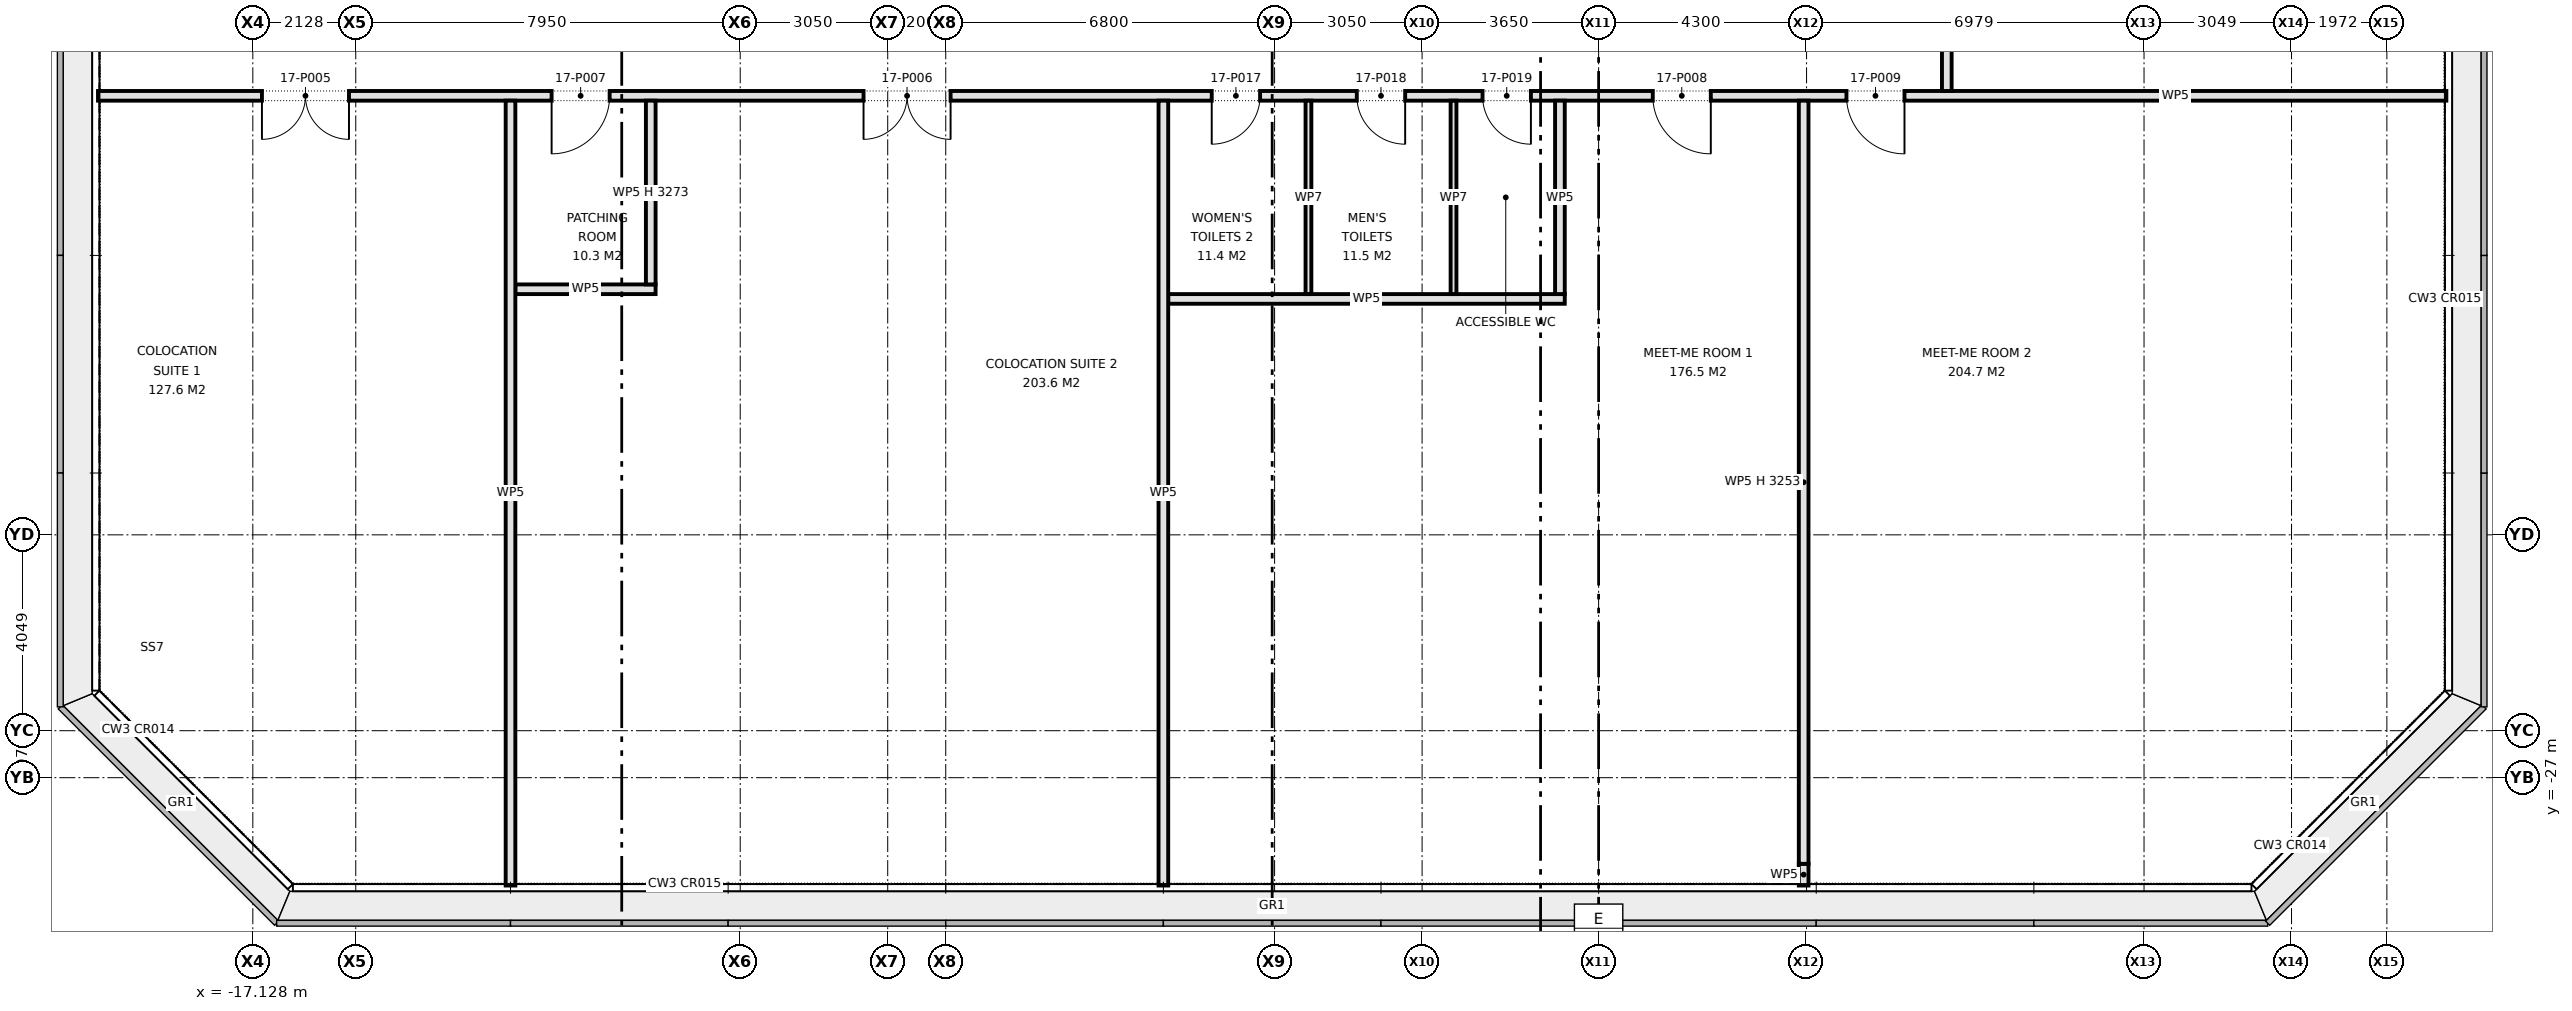
"""IFC4 building model, lengths in metres.
Left out: names, types, materials, properties, quantities, classifications, styles, units other than length and angle.
Written with IfcOpenShell. Run it as: python <this file> out.ifc"""

import sys

from ifc_helpers import new_model, si_unit, direction, frame, frame_2d, origin, place, context, subcontext, project, spatial, rectangle, extrude, element, fill, save


model = new_model("IFC4")
c1 = context("Model", 3, precision=1e-05, world=origin(), true_north=direction((0.0, 1.0)))
c2 = subcontext(c1, "Body", "Model", "MODEL_VIEW")
j1 = project(units=[si_unit("LENGTHUNIT", "METRE"), si_unit("PLANEANGLEUNIT", "RADIAN")], contexts=[c1])
p1 = place(None, origin())
s1 = spatial("IfcSite", under=j1, at=p1, CompositionType="ELEMENT")
p2 = place(p1, origin())
s2 = spatial("IfcBuilding", under=s1, at=p2, CompositionType="ELEMENT")
p3 = place(p2, frame((0.0, 0.0, 77.6)))
s3 = spatial("IfcBuildingStorey", under=s2, at=p3, CompositionType="ELEMENT", Elevation=77.6)
p4 = place(p3, frame((1.8, -17.1, 0.0), z_axis=(0.0, 0.0, 1.0), x_axis=(1.0, 0.0, 0.0)))
e1 = element("IfcWall", 1, at=p4, inside=s3, PredefinedType="PARTITIONING", context=c2, shape_type="SweptSolid", body=[
    extrude(rectangle(XDim=8.2, YDim=0.2, at=frame_2d((4.1, 0.0))), origin(), (0.0, 0.0, 1.0), 4.2),
])
p5 = place(p3, frame((-11.7, -16.9, 0.0), z_axis=(0.0, 0.0, 1.0), x_axis=(1.0, 0.0, 0.0)))
e2 = element("IfcWall", 2, at=p5, inside=s3, PredefinedType="PARTITIONING", context=c2, shape_type="SweptSolid", body=[
    extrude(rectangle(XDim=2.9, YDim=0.2, at=frame_2d((1.45, 0.0))), origin(), (0.0, 0.0, 1.0), 4.2),
])
p6 = place(p3, frame((-20.33, -12.9, 0.0), z_axis=(0.0, 0.0, 1.0), x_axis=(1.0, 0.0, 0.0)))
e3 = element("IfcWall", 3, at=p6, inside=s3, PredefinedType="PARTITIONING", context=c2, shape_type="SweptSolid", body=[
    extrude(rectangle(XDim=48.56, YDim=0.2, at=frame_2d((24.28, 0.0))), origin(), (0.0, 0.0, 1.0), 4.2),
])
p7 = place(p6, frame((3.39, 0.0, 0.0)))
e4 = element("IfcOpeningElement", 4, at=p7, cuts=e3, PredefinedType="OPENING", context=c2, shape_type="SweptSolid", body=[
    extrude(rectangle(XDim=1.8, YDim=2.1, at=frame_2d((0.9, 1.05))), frame((0.0, 0.11, 0.0), z_axis=(0.0, -1.0, 0.0), x_axis=(1.0, 0.0, 0.0)), (0.0, 0.0, 1.0), 0.22),
])
p8 = place(p6, frame((15.83, 0.0, 0.0)))
e5 = element("IfcOpeningElement", 5, at=p8, cuts=e3, PredefinedType="OPENING", context=c2, shape_type="SweptSolid", body=[
    extrude(rectangle(XDim=1.8, YDim=2.1, at=frame_2d((0.9, 1.05))), frame((0.0, 0.11, 0.0), z_axis=(0.0, -1.0, 0.0), x_axis=(1.0, 0.0, 0.0)), (0.0, 0.0, 1.0), 0.22),
])
p9 = place(p6, frame((9.38, 0.0, 0.0)))
e6 = element("IfcOpeningElement", 6, at=p9, cuts=e3, PredefinedType="OPENING", context=c2, shape_type="SweptSolid", body=[
    extrude(rectangle(XDim=1.2, YDim=2.1, at=frame_2d((0.6, 1.05))), frame((0.0, 0.11, 0.0), z_axis=(0.0, -1.0, 0.0), x_axis=(1.0, 0.0, 0.0)), (0.0, 0.0, 1.0), 0.22),
])
p10 = place(p6, frame((32.15, 0.0, 0.0)))
e7 = element("IfcOpeningElement", 7, at=p10, cuts=e3, PredefinedType="OPENING", context=c2, shape_type="SweptSolid", body=[
    extrude(rectangle(XDim=1.2, YDim=2.1, at=frame_2d((0.6, 1.05))), frame((0.0, 0.11, 0.0), z_axis=(0.0, -1.0, 0.0), x_axis=(1.0, 0.0, 0.0)), (0.0, 0.0, 1.0), 0.22),
])
p11 = place(p6, frame((36.155, 0.0, 0.0)))
e8 = element("IfcOpeningElement", 8, at=p11, cuts=e3, PredefinedType="OPENING", context=c2, shape_type="SweptSolid", body=[
    extrude(rectangle(XDim=1.2, YDim=2.1, at=frame_2d((0.6, 1.05))), frame((0.0, 0.11, 0.0), z_axis=(0.0, -1.0, 0.0), x_axis=(1.0, 0.0, 0.0)), (0.0, 0.0, 1.0), 0.22),
])
p12 = place(p6, frame((23.03, 0.0, 0.0)))
e9 = element("IfcOpeningElement", 9, at=p12, cuts=e3, PredefinedType="OPENING", context=c2, shape_type="SweptSolid", body=[
    extrude(rectangle(XDim=1.0, YDim=2.1, at=frame_2d((0.5, 1.05))), frame((0.0, 0.11, 0.0), z_axis=(0.0, -1.0, 0.0), x_axis=(1.0, 0.0, 0.0)), (0.0, 0.0, 1.0), 0.22),
])
p13 = place(p6, frame((26.03, 0.0, 0.0)))
e10 = element("IfcOpeningElement", 10, at=p13, cuts=e3, PredefinedType="OPENING", context=c2, shape_type="SweptSolid", body=[
    extrude(rectangle(XDim=1.0, YDim=2.1, at=frame_2d((0.5, 1.05))), frame((0.0, 0.11, 0.0), z_axis=(0.0, -1.0, 0.0), x_axis=(1.0, 0.0, 0.0)), (0.0, 0.0, 1.0), 0.22),
])
p14 = place(p6, frame((28.63, 0.0, 0.0)))
e11 = element("IfcOpeningElement", 11, at=p14, cuts=e3, PredefinedType="OPENING", context=c2, shape_type="SweptSolid", body=[
    extrude(rectangle(XDim=1.0, YDim=2.1, at=frame_2d((0.5, 1.05))), frame((0.0, 0.11, 0.0), z_axis=(0.0, -1.0, 0.0), x_axis=(1.0, 0.0, 0.0)), (0.0, 0.0, 1.0), 0.22),
])
p15 = place(p3, frame((17.9, -12.8, 0.0), z_axis=(0.0, 0.0, 1.0), x_axis=(0.0, 1.0, 0.0)))
e12 = element("IfcWall", 12, at=p15, inside=s3, PredefinedType="PARTITIONING", context=c2, shape_type="SweptSolid", body=[
    extrude(rectangle(XDim=25.6, YDim=0.2, at=frame_2d((12.8, 0.0))), origin(), (0.0, 0.0, 1.0), 4.2),
])
p16 = place(p15, frame((4.4, 0.0, 0.0)))
e13 = element("IfcOpeningElement", 13, at=p16, cuts=e12, PredefinedType="OPENING", context=c2, shape_type="SweptSolid", body=[
    extrude(rectangle(XDim=1.2, YDim=2.1, at=frame_2d((0.6, 1.05))), frame((0.0, 0.11, 0.0), z_axis=(0.0, -1.0, 0.0), x_axis=(1.0, 0.0, 0.0)), (0.0, 0.0, 1.0), 0.22),
])
p17 = place(p15, frame((15.95, 0.0, 0.0)))
e14 = element("IfcOpeningElement", 14, at=p17, cuts=e12, PredefinedType="OPENING", context=c2, shape_type="SweptSolid", body=[
    extrude(rectangle(XDim=1.8, YDim=2.1, at=frame_2d((0.9, 1.05))), frame((0.0, 0.11, 0.0), z_axis=(0.0, -1.0, 0.0), x_axis=(1.0, 0.0, 0.0)), (0.0, 0.0, 1.0), 0.22),
])
p18 = place(p3, frame((14.94, -29.23, 0.0), z_axis=(0.0, 0.0, 1.0), x_axis=(0.0, 1.0, 0.0)))
e15 = element("IfcWall", 15, at=p18, inside=s3, PredefinedType="PARTITIONING", context=c2, shape_type="SweptSolid", body=[
    extrude(rectangle(XDim=0.449, YDim=0.2, at=frame_2d((0.225, 0.0))), origin(), (0.0, 0.0, 1.0), 4.2),
])
p19 = place(p3, frame((14.94, -28.781, 0.0), z_axis=(0.0, 0.0, 1.0), x_axis=(0.0, 1.0, 0.0)))
e16 = element("IfcWall", 16, at=p19, inside=s3, PredefinedType="PARTITIONING", context=c2, shape_type="SweptSolid", body=[
    extrude(rectangle(XDim=15.781, YDim=0.2, at=frame_2d((7.891, 0.0))), origin(), (0.0, 0.0, 1.0), 3.252),
])
p20 = place(p3, frame((9.9, -17.0, 0.0), z_axis=(0.0, 0.0, 1.0), x_axis=(0.0, 1.0, 0.0)))
e17 = element("IfcWall", 17, at=p20, inside=s3, PredefinedType="PARTITIONING", context=c2, shape_type="SweptSolid", body=[
    extrude(rectangle(XDim=4.0, YDim=0.2, at=frame_2d((2.0, 0.0))), origin(), (0.0, 0.0, 1.0), 4.2),
])
p21 = place(p3, frame((1.7, -29.23, 0.0), z_axis=(0.0, 0.0, 1.0), x_axis=(0.0, 1.0, 0.0)))
e18 = element("IfcWall", 18, at=p21, inside=s3, PredefinedType="PARTITIONING", context=c2, shape_type="SweptSolid", body=[
    extrude(rectangle(XDim=16.23, YDim=0.2, at=frame_2d((8.115, 0.0))), origin(), (0.0, 0.0, 1.0), 4.2),
])
p22 = place(p3, frame((-8.9, -16.8, 0.0), z_axis=(0.0, 0.0, 1.0), x_axis=(0.0, 1.0, 0.0)))
e19 = element("IfcWall", 19, at=p22, inside=s3, PredefinedType="PARTITIONING", context=c2, shape_type="SweptSolid", body=[
    extrude(rectangle(XDim=3.8, YDim=0.2, at=frame_2d((1.9, 0.0))), origin(), (0.0, 0.0, 1.0), 3.273),
])
p23 = place(p3, frame((-11.8, -29.23, 0.0), z_axis=(0.0, 0.0, 1.0), x_axis=(0.0, 1.0, 0.0)))
e20 = element("IfcWall", 20, at=p23, inside=s3, PredefinedType="PARTITIONING", context=c2, shape_type="SweptSolid", body=[
    extrude(rectangle(XDim=16.23, YDim=0.2, at=frame_2d((8.115, 0.0))), origin(), (0.0, 0.0, 1.0), 4.2),
])
for number, where, z_axis, x_axis in (
    (21, (7.7, -17.0, 0.0), (0.0, 0.0, 1.0), (0.0, 1.0, 0.0)),
    (22, (4.7, -17.0, 0.0), (0.0, 0.0, 1.0), (0.0, 1.0, 0.0)),
):
    element("IfcWall", number, at=place(p3, frame(where, z_axis=z_axis, x_axis=x_axis)), inside=s3, PredefinedType="PARTITIONING", context=c2, shape_type="SweptSolid", body=[
        extrude(rectangle(XDim=4.0, YDim=0.12, at=frame_2d((2.0, 0.0))), origin(), (0.0, 0.0, 1.0), 4.2),
    ])
p24 = place(p7, frame((1.8, 0.0, 0.0), z_axis=(0.0, 0.0, 1.0), x_axis=(-1.0, 0.0, 0.0)))
e23 = element("IfcDoor", 23, at=p24, inside=s3, OperationType="DOUBLE_DOOR_SINGLE_SWING", PredefinedType="DOOR", context=c2, shape_type="SweptSolid", body=[
    extrude(rectangle(XDim=1.8, YDim=2.1, at=frame_2d((0.9, 1.05))), frame((0.0, 0.025, 0.0), z_axis=(0.0, -1.0, 0.0), x_axis=(1.0, 0.0, 0.0)), (0.0, 0.0, 1.0), 0.05),
])
fill(e4, e23)
p25 = place(p8, frame((1.8, 0.0, 0.0), z_axis=(0.0, 0.0, 1.0), x_axis=(-1.0, 0.0, 0.0)))
e24 = element("IfcDoor", 24, at=p25, inside=s3, OperationType="DOUBLE_DOOR_SINGLE_SWING", PredefinedType="DOOR", context=c2, shape_type="SweptSolid", body=[
    extrude(rectangle(XDim=1.8, YDim=2.1, at=frame_2d((0.9, 1.05))), frame((0.0, 0.025, 0.0), z_axis=(0.0, -1.0, 0.0), x_axis=(1.0, 0.0, 0.0)), (0.0, 0.0, 1.0), 0.05),
])
fill(e5, e24)
p26 = place(p9, frame((1.2, 0.0, 0.0), z_axis=(0.0, 0.0, 1.0), x_axis=(-1.0, 0.0, 0.0)))
e25 = element("IfcDoor", 25, at=p26, inside=s3, OperationType="SINGLE_SWING_RIGHT", PredefinedType="DOOR", context=c2, shape_type="SweptSolid", body=[
    extrude(rectangle(XDim=1.2, YDim=2.1, at=frame_2d((0.6, 1.05))), frame((0.0, 0.025, 0.0), z_axis=(0.0, -1.0, 0.0), x_axis=(1.0, 0.0, 0.0)), (0.0, 0.0, 1.0), 0.05),
])
fill(e6, e25)
p27 = place(p10, frame((1.2, 0.0, 0.0), z_axis=(0.0, 0.0, 1.0), x_axis=(-1.0, 0.0, 0.0)))
e26 = element("IfcDoor", 26, at=p27, inside=s3, OperationType="SINGLE_SWING_LEFT", PredefinedType="DOOR", context=c2, shape_type="SweptSolid", body=[
    extrude(rectangle(XDim=1.2, YDim=2.1, at=frame_2d((0.6, 1.05))), frame((0.0, 0.025, 0.0), z_axis=(0.0, -1.0, 0.0), x_axis=(1.0, 0.0, 0.0)), (0.0, 0.0, 1.0), 0.05),
])
fill(e7, e26)
p28 = place(p11, frame((1.2, 0.0, 0.0), z_axis=(0.0, 0.0, 1.0), x_axis=(-1.0, 0.0, 0.0)))
e27 = element("IfcDoor", 27, at=p28, inside=s3, OperationType="SINGLE_SWING_LEFT", PredefinedType="DOOR", context=c2, shape_type="SweptSolid", body=[
    extrude(rectangle(XDim=1.2, YDim=2.1, at=frame_2d((0.6, 1.05))), frame((0.0, 0.025, 0.0), z_axis=(0.0, -1.0, 0.0), x_axis=(1.0, 0.0, 0.0)), (0.0, 0.0, 1.0), 0.05),
])
fill(e8, e27)
p29 = place(p12, frame((1.0, 0.0, 0.0), z_axis=(0.0, 0.0, 1.0), x_axis=(-1.0, 0.0, 0.0)))
e28 = element("IfcDoor", 28, at=p29, inside=s3, OperationType="SINGLE_SWING_RIGHT", PredefinedType="DOOR", context=c2, shape_type="SweptSolid", body=[
    extrude(rectangle(XDim=1.0, YDim=2.1, at=frame_2d((0.5, 1.05))), frame((0.0, 0.025, 0.0), z_axis=(0.0, -1.0, 0.0), x_axis=(1.0, 0.0, 0.0)), (0.0, 0.0, 1.0), 0.05),
])
fill(e9, e28)
p30 = place(p13, frame((1.0, 0.0, 0.0), z_axis=(0.0, 0.0, 1.0), x_axis=(-1.0, 0.0, 0.0)))
e29 = element("IfcDoor", 29, at=p30, inside=s3, OperationType="SINGLE_SWING_LEFT", PredefinedType="DOOR", context=c2, shape_type="SweptSolid", body=[
    extrude(rectangle(XDim=1.0, YDim=2.1, at=frame_2d((0.5, 1.05))), frame((0.0, 0.025, 0.0), z_axis=(0.0, -1.0, 0.0), x_axis=(1.0, 0.0, 0.0)), (0.0, 0.0, 1.0), 0.05),
])
fill(e10, e29)
p31 = place(p14, frame((1.0, 0.0, 0.0), z_axis=(0.0, 0.0, 1.0), x_axis=(-1.0, 0.0, 0.0)))
e30 = element("IfcDoor", 30, at=p31, inside=s3, OperationType="SINGLE_SWING_LEFT", PredefinedType="DOOR", context=c2, shape_type="SweptSolid", body=[
    extrude(rectangle(XDim=1.0, YDim=2.1, at=frame_2d((0.5, 1.05))), frame((0.0, 0.025, 0.0), z_axis=(0.0, -1.0, 0.0), x_axis=(1.0, 0.0, 0.0)), (0.0, 0.0, 1.0), 0.05),
])
fill(e11, e30)
save(model, sys.argv[1])
